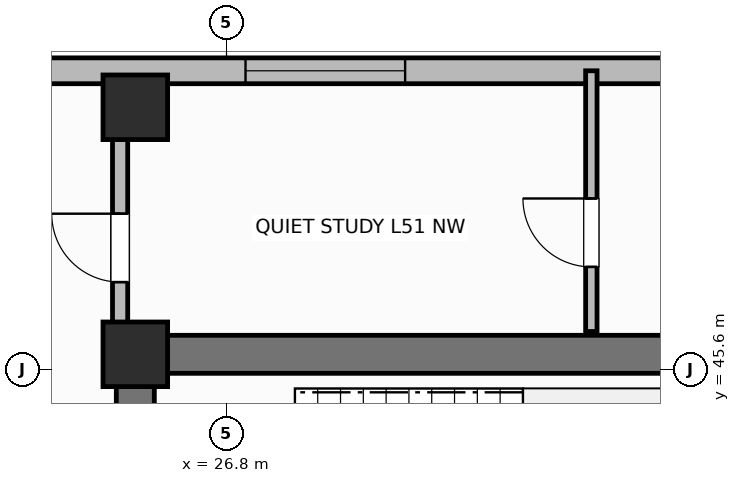
"""IFC4 building model, lengths in metres.
Left out: names, types, materials, properties, quantities, classifications, styles, units other than length and angle.
Written with IfcOpenShell. Run it as: python <this file> out.ifc"""

import sys

from ifc_helpers import new_model, si_unit, direction, frame, frame_2d, origin, origin_2d, place, context, subcontext, project, spatial, rectangle, extrude, element, fill, save


model = new_model("IFC4")
c1 = context("Model", 3, precision=1e-05, world=origin(), true_north=direction((0.0, 1.0)))
c2 = subcontext(c1, "Body", "Model", "MODEL_VIEW")
j1 = project(units=[si_unit("LENGTHUNIT", "METRE"), si_unit("PLANEANGLEUNIT", "RADIAN")], contexts=[c1])
p1 = place(None, origin())
s1 = spatial("IfcSite", under=j1, at=p1, CompositionType="ELEMENT")
p2 = place(p1, origin())
s2 = spatial("IfcBuilding", under=s1, at=p2, CompositionType="ELEMENT")
p3 = place(p2, frame((0.0, 0.0, 207.3)))
s3 = spatial("IfcBuildingStorey", under=s2, at=p3, CompositionType="ELEMENT", Elevation=207.3)
p4 = place(p3, frame((25.6, 45.8, 0.0), z_axis=(0.0, 0.0, 1.0), x_axis=(1.0, 0.0, 0.0)))
e1 = element("IfcWall", 1, at=p4, inside=s3, PredefinedType="SHEAR", context=c2, shape_type="SweptSolid", body=[
    extrude(rectangle(XDim=27.2, YDim=0.5, at=frame_2d((13.6, 0.0))), origin(), (0.0, 0.0, 1.0), 3.7),
])
p5 = place(p3, frame((25.6, 39.85, 0.0), z_axis=(0.0, 0.0, 1.0), x_axis=(0.0, 1.0, 0.0)))
e2 = element("IfcWall", 2, at=p5, inside=s3, PredefinedType="SHEAR", context=c2, shape_type="SweptSolid", body=[
    extrude(rectangle(XDim=5.7, YDim=0.5, at=frame_2d((2.85, 0.0))), origin(), (0.0, 0.0, 1.0), 3.7),
])
for number, where, z_axis, x_axis in (
    (3, (25.6, 45.8, 0.0), (0.0, 0.0, 1.0), (1.0, 0.0, 0.0)),
    (4, (25.6, 49.05, 0.0), (0.0, 0.0, 1.0), (1.0, 0.0, 0.0)),
):
    element("IfcColumn", number, at=place(p3, frame(where, z_axis=z_axis, x_axis=x_axis)), inside=s3, PredefinedType="COLUMN", context=c2, shape_type="SweptSolid", body=[
        extrude(rectangle(XDim=0.85, YDim=0.85, at=origin_2d()), origin(), (0.0, 0.0, 1.0), 3.7),
    ])
p6 = place(p3, frame((36.0, 49.53, 0.0), z_axis=(0.0, 0.0, 1.0), x_axis=(-1.0, 0.0, 0.0)))
e5 = element("IfcWall", 5, at=p6, inside=s3, PredefinedType="SOLIDWALL", context=c2, shape_type="SweptSolid", body=[
    extrude(rectangle(XDim=15.8, YDim=0.34, at=frame_2d((7.9, 0.0))), origin(), (0.0, 0.0, 1.0), 2.72),
])
p7 = place(p6, frame((6.85, 0.0, 0.7)))
e6 = element("IfcOpeningElement", 6, at=p7, cuts=e5, PredefinedType="OPENING", context=c2, shape_type="SweptSolid", body=[
    extrude(rectangle(XDim=2.1, YDim=1.9, at=frame_2d((1.05, 0.95))), frame((0.0, 0.18, 0.0), z_axis=(0.0, -1.0, 0.0), x_axis=(1.0, 0.0, 0.0)), (0.0, 0.0, 1.0), 0.36),
])
p8 = place(p3, frame((31.6, 46.1, 0.0), z_axis=(0.0, 0.0, 1.0), x_axis=(0.0, 1.0, 0.0)))
e7 = element("IfcWall", 7, at=p8, inside=s3, PredefinedType="PARTITIONING", context=c2, shape_type="SweptSolid", body=[
    extrude(rectangle(XDim=3.43, YDim=0.15, at=frame_2d((1.715, 0.0))), origin(), (0.0, 0.0, 1.0), 2.55),
])
p9 = place(p8, frame((0.85, 0.0, 0.0)))
e8 = element("IfcOpeningElement", 8, at=p9, cuts=e7, PredefinedType="OPENING", context=c2, shape_type="SweptSolid", body=[
    extrude(rectangle(XDim=0.9, YDim=2.1, at=frame_2d((0.45, 1.05))), frame((0.0, 0.085, 0.0), z_axis=(0.0, -1.0, 0.0), x_axis=(1.0, 0.0, 0.0)), (0.0, 0.0, 1.0), 0.17),
])
p10 = place(p3, frame((25.4, 46.1, 0.0), z_axis=(0.0, 0.0, 1.0), x_axis=(0.0, 1.0, 0.0)))
e9 = element("IfcWall", 9, at=p10, inside=s3, PredefinedType="PARTITIONING", context=c2, shape_type="SweptSolid", body=[
    extrude(rectangle(XDim=2.73, YDim=0.2, at=frame_2d((1.365, 0.0))), origin(), (0.0, 0.0, 1.0), 2.55),
])
p11 = place(p10, frame((0.65, 0.0, 0.0)))
e10 = element("IfcOpeningElement", 10, at=p11, cuts=e9, PredefinedType="OPENING", context=c2, shape_type="SweptSolid", body=[
    extrude(rectangle(XDim=0.9, YDim=2.1, at=frame_2d((0.45, 1.05))), frame((0.0, 0.11, 0.0), z_axis=(0.0, -1.0, 0.0), x_axis=(1.0, 0.0, 0.0)), (0.0, 0.0, 1.0), 0.22),
])
p12 = place(p7, origin())
e11 = element("IfcWindow", 11, at=p12, inside=s3, PartitioningType="SINGLE_PANEL", PredefinedType="WINDOW", context=c2, shape_type="SweptSolid", body=[
    extrude(rectangle(XDim=2.1, YDim=1.9, at=frame_2d((1.05, 0.95))), frame((0.0, 0.03, 0.0), z_axis=(0.0, -1.0, 0.0), x_axis=(1.0, 0.0, 0.0)), (0.0, 0.0, 1.0), 0.06),
])
fill(e6, e11)
p13 = place(p9, origin())
e12 = element("IfcDoor", 12, at=p13, inside=s3, OperationType="SINGLE_SWING_RIGHT", PredefinedType="DOOR", context=c2, shape_type="SweptSolid", body=[
    extrude(rectangle(XDim=0.9, YDim=2.1, at=frame_2d((0.45, 1.05))), frame((0.0, 0.025, 0.0), z_axis=(0.0, -1.0, 0.0), x_axis=(1.0, 0.0, 0.0)), (0.0, 0.0, 1.0), 0.05),
])
fill(e8, e12)
p14 = place(p11, origin())
e13 = element("IfcDoor", 13, at=p14, inside=s3, OperationType="SINGLE_SWING_RIGHT", PredefinedType="DOOR", context=c2, shape_type="SweptSolid", body=[
    extrude(rectangle(XDim=0.9, YDim=2.1, at=frame_2d((0.45, 1.05))), frame((0.0, 0.025, 0.0), z_axis=(0.0, -1.0, 0.0), x_axis=(1.0, 0.0, 0.0)), (0.0, 0.0, 1.0), 0.05),
])
fill(e10, e13)
save(model, sys.argv[1])
